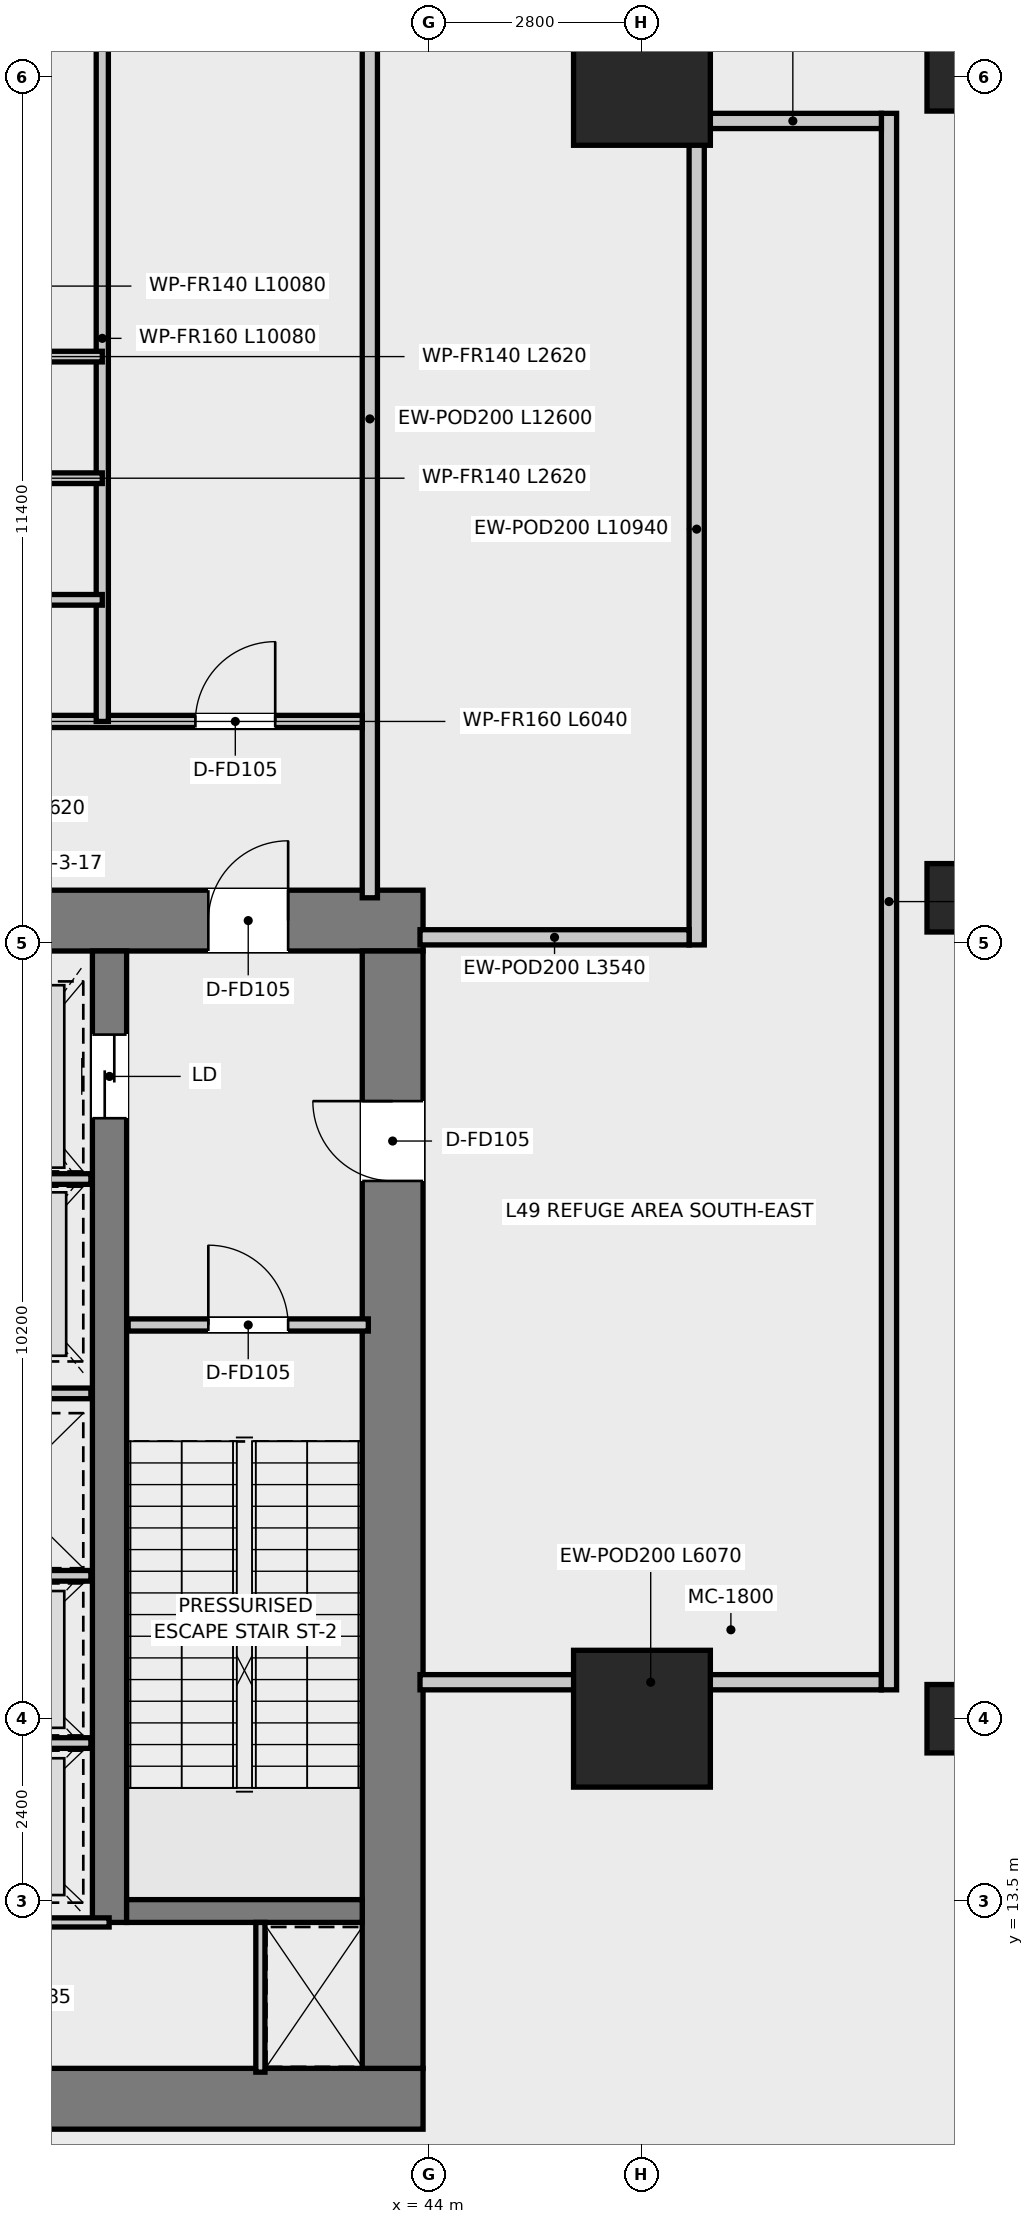
"""IFC4 building model, lengths in metres.
Left out: names, types, materials, properties, quantities, classifications, styles, units other than length and angle.
Written with IfcOpenShell. Run it as: python <this file> out.ifc"""

import sys

from ifc_helpers import new_model, si_unit, direction, frame, frame_2d, origin, origin_2d, place, context, subcontext, project, spatial, rectangle, extrude, source, transform, mapped, element, fill, save


model = new_model("IFC4")
c1 = context("Model", 3, precision=1e-05, world=origin(), true_north=direction((0.0, 1.0)))
c2 = subcontext(c1, "Body", "Model", "MODEL_VIEW")
j1 = project(units=[si_unit("LENGTHUNIT", "METRE"), si_unit("PLANEANGLEUNIT", "RADIAN")], contexts=[c1])
p1 = place(None, origin())
s1 = spatial("IfcSite", under=j1, at=p1, CompositionType="ELEMENT")
p2 = place(p1, origin())
s2 = spatial("IfcBuilding", under=s1, at=p2, CompositionType="ELEMENT")
p3 = place(p2, frame((0.0, 0.0, 201.5)))
s3 = spatial("IfcBuildingStorey", under=s2, at=p3, CompositionType="ELEMENT", Elevation=201.5)
p4 = place(p3, frame((28.08, 10.9, 0.0), z_axis=(0.0, 0.0, 1.0), x_axis=(1.0, 0.0, 0.0)))
e1 = element("IfcWall", 1, at=p4, inside=s3, PredefinedType="SHEAR", context=c2, shape_type="SweptSolid", body=[
    extrude(rectangle(XDim=15.84, YDim=0.8, at=frame_2d((7.92, 0.0))), origin(), (0.0, 0.0, 1.0), 5.8),
])
p5 = place(p3, frame((28.08, 26.4, 0.0), z_axis=(0.0, 0.0, 1.0), x_axis=(1.0, 0.0, 0.0)))
e2 = element("IfcWall", 2, at=p5, inside=s3, PredefinedType="SHEAR", context=c2, shape_type="SweptSolid", body=[
    extrude(rectangle(XDim=15.84, YDim=0.8, at=frame_2d((7.92, 0.0))), origin(), (0.0, 0.0, 1.0), 5.8),
])
p6 = place(p5, frame((7.22, 0.0, 0.0)))
e3 = element("IfcOpeningElement", 3, at=p6, cuts=e2, PredefinedType="OPENING", context=c2, shape_type="SweptSolid", body=[
    extrude(rectangle(XDim=1.4, YDim=2.2, at=frame_2d((0.7, 1.1))), frame((0.0, 0.41, 0.0), z_axis=(0.0, -1.0, 0.0), x_axis=(1.0, 0.0, 0.0)), (0.0, 0.0, 1.0), 0.82),
])
p7 = place(p5, frame((1.775, 0.0, 0.0)))
e4 = element("IfcOpeningElement", 4, at=p7, cuts=e2, PredefinedType="OPENING", context=c2, shape_type="SweptSolid", body=[
    extrude(rectangle(XDim=1.05, YDim=2.1, at=frame_2d((0.525, 1.05))), frame((0.0, 0.41, 0.0), z_axis=(0.0, -1.0, 0.0), x_axis=(1.0, 0.0, 0.0)), (0.0, 0.0, 1.0), 0.82),
])
p8 = place(p5, frame((13.015, 0.0, 0.0)))
e5 = element("IfcOpeningElement", 5, at=p8, cuts=e2, PredefinedType="OPENING", context=c2, shape_type="SweptSolid", body=[
    extrude(rectangle(XDim=1.05, YDim=2.1, at=frame_2d((0.525, 1.05))), frame((0.0, 0.41, 0.0), z_axis=(0.0, -1.0, 0.0), x_axis=(1.0, 0.0, 0.0)), (0.0, 0.0, 1.0), 0.82),
])
p9 = place(p3, frame((43.52, 11.3, 0.0), z_axis=(0.0, 0.0, 1.0), x_axis=(0.0, 1.0, 0.0)))
e6 = element("IfcWall", 6, at=p9, inside=s3, PredefinedType="SHEAR", context=c2, shape_type="SweptSolid", body=[
    extrude(rectangle(XDim=14.7, YDim=0.8, at=frame_2d((7.35, 0.0))), origin(), (0.0, 0.0, 1.0), 5.8),
])
p10 = place(p9, frame((11.675, 0.0, 0.0)))
e7 = element("IfcOpeningElement", 7, at=p10, cuts=e6, PredefinedType="OPENING", context=c2, shape_type="SweptSolid", body=[
    extrude(rectangle(XDim=1.05, YDim=2.1, at=frame_2d((0.525, 1.05))), frame((0.0, 0.41, 0.0), z_axis=(0.0, -1.0, 0.0), x_axis=(1.0, 0.0, 0.0)), (0.0, 0.0, 1.0), 0.82),
])
p11 = place(p3, frame((39.795, 13.22, 0.0), z_axis=(0.0, 0.0, 1.0), x_axis=(0.0, 1.0, 0.0)))
e8 = element("IfcWall", 8, at=p11, inside=s3, PredefinedType="SHEAR", context=c2, shape_type="SweptSolid", body=[
    extrude(rectangle(XDim=12.78, YDim=0.45, at=frame_2d((6.39, 0.0))), origin(), (0.0, 0.0, 1.0), 5.8),
])
p12 = place(p11, frame((10.58, 0.0, 0.0)))
e9 = element("IfcOpeningElement", 9, at=p12, cuts=e8, PredefinedType="OPENING", context=c2, shape_type="SweptSolid", body=[
    extrude(rectangle(XDim=1.1, YDim=2.15, at=frame_2d((0.55, 1.075))), frame((0.0, 0.235, 0.0), z_axis=(0.0, -1.0, 0.0), x_axis=(1.0, 0.0, 0.0)), (0.0, 0.0, 1.0), 0.47),
])
p13 = place(p3, frame((40.02, 13.37, 0.0), z_axis=(0.0, 0.0, 1.0), x_axis=(1.0, 0.0, 0.0)))
e10 = element("IfcWall", 10, at=p13, inside=s3, PredefinedType="SHEAR", context=c2, shape_type="SweptSolid", body=[
    extrude(rectangle(XDim=3.1, YDim=0.3, at=frame_2d((1.55, 0.0))), origin(), (0.0, 0.0, 1.0), 5.8),
])
m1 = source(origin(), c2, "Body", "SweptSolid", [
    extrude(rectangle(XDim=1.8, YDim=1.8, at=origin_2d()), origin(), (0.0, 0.0, 1.0), 5.8),
])
for number, where, z_axis, x_axis in (
    (11, (46.8, 15.9, 0.0), (0.0, 0.0, 1.0), (1.0, 0.0, 0.0)),
    (12, (46.8, 37.5, 0.0), (0.0, 0.0, 1.0), (1.0, 0.0, 0.0)),
):
    element("IfcColumn", number, at=place(p3, frame(where, z_axis=z_axis, x_axis=x_axis)), inside=s3, PredefinedType="USERDEFINED", context=c2, shape_type="MappedRepresentation", body=[
        mapped(m1, transform((0.0, 0.0, 0.0), x_axis=(1.0, 0.0, 0.0), y_axis=(0.0, 1.0, 0.0), z_axis=(0.0, 0.0, 1.0), scale=1.0)),
    ])
m2 = source(origin(), c2, "Body", "SweptSolid", [
    extrude(rectangle(XDim=0.9, YDim=0.9, at=origin_2d()), origin(), (0.0, 0.0, 1.0), 5.8),
])
for number, where, z_axis, x_axis in (
    (13, (51.0, 37.5, 0.0), (0.0, 0.0, 1.0), (1.0, 0.0, 0.0)),
    (14, (51.0, 26.7, 0.0), (0.0, 0.0, 1.0), (1.0, 0.0, 0.0)),
    (15, (51.0, 15.9, 0.0), (0.0, 0.0, 1.0), (1.0, 0.0, 0.0)),
):
    element("IfcColumn", number, at=place(p3, frame(where, z_axis=z_axis, x_axis=x_axis)), inside=s3, PredefinedType="COLUMN", context=c2, shape_type="MappedRepresentation", body=[
        mapped(m2, transform((0.0, 0.0, 0.0), x_axis=(1.0, 0.0, 0.0), y_axis=(0.0, 1.0, 0.0), z_axis=(0.0, 0.0, 1.0), scale=1.0)),
    ])
p14 = place(p3, frame((40.04, 21.08, 0.0), z_axis=(0.0, 0.0, 1.0), x_axis=(1.0, 0.0, 0.0)))
e16 = element("IfcWall", 16, at=p14, inside=s3, PredefinedType="PARTITIONING", context=c2, shape_type="SweptSolid", body=[
    extrude(rectangle(XDim=3.16, YDim=0.16, at=frame_2d((1.58, 0.0))), origin(), (0.0, 0.0, 1.0), 5.52),
])
p15 = place(p14, frame((1.055, 0.0, 0.0)))
e17 = element("IfcOpeningElement", 17, at=p15, cuts=e16, PredefinedType="OPENING", context=c2, shape_type="SweptSolid", body=[
    extrude(rectangle(XDim=1.05, YDim=2.1, at=frame_2d((0.525, 1.05))), frame((0.0, 0.09, 0.0), z_axis=(0.0, -1.0, 0.0), x_axis=(1.0, 0.0, 0.0)), (0.0, 0.0, 1.0), 0.18),
])
p16 = place(p3, frame((37.28, 23.0, 0.0), z_axis=(0.0, 0.0, 1.0), x_axis=(1.0, 0.0, 0.0)))
e18 = element("IfcWall", 18, at=p16, inside=s3, PredefinedType="PARTITIONING", context=c2, shape_type="SweptSolid", body=[
    extrude(rectangle(XDim=2.27, YDim=0.14, at=frame_2d((1.135, 0.0))), origin(), (0.0, 0.0, 1.0), 4.52),
])
for number, where, z_axis, x_axis in (
    (19, (37.28, 17.78, 0.0), (0.0, 0.0, 1.0), (1.0, 0.0, 0.0)),
    (20, (37.28, 20.18, 0.0), (0.0, 0.0, 1.0), (1.0, 0.0, 0.0)),
    (21, (37.28, 15.58, 0.0), (0.0, 0.0, 1.0), (1.0, 0.0, 0.0)),
):
    element("IfcWall", number, at=place(p3, frame(where, z_axis=z_axis, x_axis=x_axis)), inside=s3, PredefinedType="PARTITIONING", context=c2, shape_type="SweptSolid", body=[
        extrude(rectangle(XDim=2.27, YDim=0.14, at=frame_2d((1.135, 0.0))), origin(), (0.0, 0.0, 1.0), 5.52),
    ])
p17 = place(p3, frame((41.78, 11.25, 0.0), z_axis=(0.0, 0.0, 1.0), x_axis=(0.0, 1.0, 0.0)))
e22 = element("IfcWall", 22, at=p17, inside=s3, PredefinedType="PARTITIONING", context=c2, shape_type="SweptSolid", body=[
    extrude(rectangle(XDim=1.97, YDim=0.12, at=frame_2d((0.985, 0.0))), origin(), (0.0, 0.0, 1.0), 5.52),
])
p18 = place(p3, frame((32.21, 13.22, 0.0), z_axis=(0.0, 0.0, 1.0), x_axis=(1.0, 0.0, 0.0)))
e23 = element("IfcWall", 23, at=p18, inside=s3, PredefinedType="PARTITIONING", context=c2, shape_type="SweptSolid", body=[
    extrude(rectangle(XDim=7.58, YDim=0.12, at=frame_2d((3.79, 0.0))), origin(), (0.0, 0.0, 1.0), 5.52),
])
p19 = place(p18, frame((3.365, 0.0, 0.0)))
e24 = element("IfcOpeningElement", 24, at=p19, cuts=e23, PredefinedType="OPENING", context=c2, shape_type="SweptSolid", body=[
    extrude(rectangle(XDim=0.85, YDim=2.1, at=frame_2d((0.425, 1.05))), frame((0.0, 0.07, 0.0), z_axis=(0.0, -1.0, 0.0), x_axis=(1.0, 0.0, 0.0)), (0.0, 0.0, 1.0), 0.14),
])
p20 = place(p3, frame((43.22, 26.7, 0.0), z_axis=(0.0, 0.0, 1.0), x_axis=(0.0, 1.0, 0.0)))
e25 = element("IfcWall", 25, at=p20, inside=s3, PredefinedType="SOLIDWALL", context=c2, shape_type="SweptSolid", body=[
    extrude(rectangle(XDim=12.6, YDim=0.2, at=frame_2d((6.3, 0.0))), origin(), (0.0, 0.0, 1.0), 4.88),
])
p21 = place(p3, frame((43.88, 16.38, 0.0), z_axis=(0.0, 0.0, 1.0), x_axis=(1.0, 0.0, 0.0)))
e26 = element("IfcWall", 26, at=p21, inside=s3, PredefinedType="SOLIDWALL", context=c2, shape_type="SweptSolid", body=[
    extrude(rectangle(XDim=6.07, YDim=0.2, at=frame_2d((3.035, 0.0))), origin(), (0.0, 0.0, 1.0), 4.88),
])
p22 = place(p3, frame((50.05, 16.28, 0.0), z_axis=(0.0, 0.0, 1.0), x_axis=(0.0, 1.0, 0.0)))
e27 = element("IfcWall", 27, at=p22, inside=s3, PredefinedType="SOLIDWALL", context=c2, shape_type="SweptSolid", body=[
    extrude(rectangle(XDim=20.74, YDim=0.2, at=frame_2d((10.37, 0.0))), origin(), (0.0, 0.0, 1.0), 4.93),
])
p23 = place(p3, frame((47.62, 36.92, 0.0), z_axis=(0.0, 0.0, 1.0), x_axis=(1.0, 0.0, 0.0)))
e28 = element("IfcWall", 28, at=p23, inside=s3, PredefinedType="SOLIDWALL", context=c2, shape_type="SweptSolid", body=[
    extrude(rectangle(XDim=2.33, YDim=0.2, at=frame_2d((1.165, 0.0))), origin(), (0.0, 0.0, 1.0), 5.52),
])
p24 = place(p3, frame((47.52, 26.08, 0.0), z_axis=(0.0, 0.0, 1.0), x_axis=(0.0, 1.0, 0.0)))
e29 = element("IfcWall", 29, at=p24, inside=s3, PredefinedType="SOLIDWALL", context=c2, shape_type="SweptSolid", body=[
    extrude(rectangle(XDim=10.94, YDim=0.2, at=frame_2d((5.47, 0.0))), origin(), (0.0, 0.0, 1.0), 4.93),
])
p25 = place(p3, frame((43.88, 26.18, 0.0), z_axis=(0.0, 0.0, 1.0), x_axis=(1.0, 0.0, 0.0)))
e30 = element("IfcWall", 30, at=p25, inside=s3, PredefinedType="SOLIDWALL", context=c2, shape_type="SweptSolid", body=[
    extrude(rectangle(XDim=3.54, YDim=0.2, at=frame_2d((1.77, 0.0))), origin(), (0.0, 0.0, 1.0), 4.88),
])
p26 = place(p3, frame((37.08, 29.02, 0.0), z_axis=(0.0, 0.0, 1.0), x_axis=(1.0, 0.0, 0.0)))
e31 = element("IfcWall", 31, at=p26, inside=s3, PredefinedType="PARTITIONING", context=c2, shape_type="SweptSolid", body=[
    extrude(rectangle(XDim=6.04, YDim=0.16, at=frame_2d((3.02, 0.0))), origin(), (0.0, 0.0, 1.0), 4.93),
])
p27 = place(p26, frame((3.845, 0.0, 0.0)))
e32 = element("IfcOpeningElement", 32, at=p27, cuts=e31, PredefinedType="OPENING", context=c2, shape_type="SweptSolid", body=[
    extrude(rectangle(XDim=1.05, YDim=2.1, at=frame_2d((0.525, 1.05))), frame((0.0, 0.09, 0.0), z_axis=(0.0, -1.0, 0.0), x_axis=(1.0, 0.0, 0.0)), (0.0, 0.0, 1.0), 0.18),
])
p28 = place(p3, frame((39.7, 29.02, 0.0), z_axis=(0.0, 0.0, 1.0), x_axis=(0.0, 1.0, 0.0)))
e33 = element("IfcWall", 33, at=p28, inside=s3, PredefinedType="PARTITIONING", context=c2, shape_type="SweptSolid", body=[
    extrude(rectangle(XDim=10.08, YDim=0.16, at=frame_2d((5.04, 0.0))), origin(), (0.0, 0.0, 1.0), 4.88),
])
p29 = place(p3, frame((37.08, 33.82, 0.0), z_axis=(0.0, 0.0, 1.0), x_axis=(1.0, 0.0, 0.0)))
e34 = element("IfcWall", 34, at=p29, inside=s3, PredefinedType="PARTITIONING", context=c2, shape_type="SweptSolid", body=[
    extrude(rectangle(XDim=2.62, YDim=0.14, at=frame_2d((1.31, 0.0))), origin(), (0.0, 0.0, 1.0), 5.07),
])
for number, where, z_axis, x_axis in (
    (35, (37.08, 30.62, 0.0), (0.0, 0.0, 1.0), (1.0, 0.0, 0.0)),
    (36, (37.08, 32.22, 0.0), (0.0, 0.0, 1.0), (1.0, 0.0, 0.0)),
):
    element("IfcWall", number, at=place(p3, frame(where, z_axis=z_axis, x_axis=x_axis)), inside=s3, PredefinedType="PARTITIONING", context=c2, shape_type="SweptSolid", body=[
        extrude(rectangle(XDim=2.62, YDim=0.14, at=frame_2d((1.31, 0.0))), origin(), (0.0, 0.0, 1.0), 5.52),
    ])
p30 = place(p15, origin())
e37 = element("IfcDoor", 37, at=p30, inside=s3, OperationType="SINGLE_SWING_LEFT", PredefinedType="DOOR", context=c2, shape_type="SweptSolid", body=[
    extrude(rectangle(XDim=1.05, YDim=2.1, at=frame_2d((0.525, 1.05))), frame((0.0, 0.025, 0.0), z_axis=(0.0, -1.0, 0.0), x_axis=(1.0, 0.0, 0.0)), (0.0, 0.0, 1.0), 0.05),
])
fill(e17, e37)
p31 = place(p8, origin())
e38 = element("IfcDoor", 38, at=p31, inside=s3, OperationType="SINGLE_SWING_RIGHT", PredefinedType="DOOR", context=c2, shape_type="SweptSolid", body=[
    extrude(rectangle(XDim=1.05, YDim=2.1, at=frame_2d((0.525, 1.05))), frame((0.0, 0.025, 0.0), z_axis=(0.0, -1.0, 0.0), x_axis=(1.0, 0.0, 0.0)), (0.0, 0.0, 1.0), 0.05),
])
fill(e5, e38)
p32 = place(p10, origin())
e39 = element("IfcDoor", 39, at=p32, inside=s3, OperationType="SINGLE_SWING_RIGHT", PredefinedType="DOOR", context=c2, shape_type="SweptSolid", body=[
    extrude(rectangle(XDim=1.05, YDim=2.1, at=frame_2d((0.525, 1.05))), frame((0.0, 0.025, 0.0), z_axis=(0.0, -1.0, 0.0), x_axis=(1.0, 0.0, 0.0)), (0.0, 0.0, 1.0), 0.05),
])
fill(e7, e39)
p33 = place(p12, origin())
e40 = element("IfcDoor", 40, at=p33, inside=s3, OperationType="DOUBLE_DOOR_SLIDING", PredefinedType="DOOR", context=c2, shape_type="SweptSolid", body=[
    extrude(rectangle(XDim=1.1, YDim=2.15, at=frame_2d((0.55, 1.075))), frame((0.0, 0.025, 0.0), z_axis=(0.0, -1.0, 0.0), x_axis=(1.0, 0.0, 0.0)), (0.0, 0.0, 1.0), 0.05),
])
fill(e9, e40)
p34 = place(p27, origin())
e41 = element("IfcDoor", 41, at=p34, inside=s3, OperationType="SINGLE_SWING_RIGHT", PredefinedType="DOOR", context=c2, shape_type="SweptSolid", body=[
    extrude(rectangle(XDim=1.05, YDim=2.1, at=frame_2d((0.525, 1.05))), frame((0.0, 0.025, 0.0), z_axis=(0.0, -1.0, 0.0), x_axis=(1.0, 0.0, 0.0)), (0.0, 0.0, 1.0), 0.05),
])
fill(e32, e41)
save(model, sys.argv[1])
